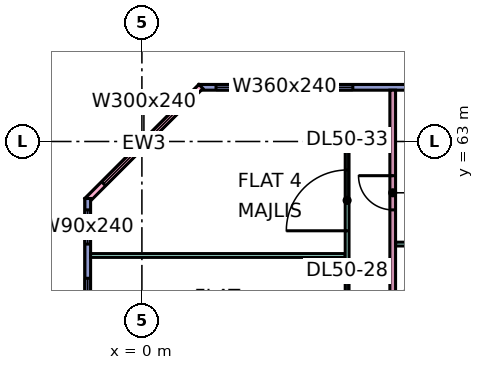
"""IFC4 building model, lengths in metres.
Left out: names, types, materials, properties, quantities, classifications, styles, units other than length and angle.
Written with IfcOpenShell. Run it as: python <this file> out.ifc"""

import sys

from ifc_helpers import new_model, si_unit, direction, frame, frame_2d, origin, place, context, subcontext, project, spatial, rectangle, extrude, element, fill, save


model = new_model("IFC4")
c1 = context("Model", 3, precision=1e-05, world=origin(), true_north=direction((0.0, 1.0)))
c2 = subcontext(c1, "Body", "Model", "MODEL_VIEW")
j1 = project(units=[si_unit("LENGTHUNIT", "METRE"), si_unit("PLANEANGLEUNIT", "RADIAN")], contexts=[c1])
p1 = place(None, origin())
s1 = spatial("IfcSite", under=j1, at=p1, CompositionType="ELEMENT")
p2 = place(p1, origin())
s2 = spatial("IfcBuilding", under=s1, at=p2, CompositionType="ELEMENT")
p3 = place(p2, frame((0.0, 0.0, 215.4)))
s3 = spatial("IfcBuildingStorey", under=s2, at=p3, CompositionType="ELEMENT", Elevation=215.4)
p4 = place(p3, frame((11.925, 64.425, 0.0), z_axis=(0.0, 0.0, 1.0), x_axis=(-1.0, 0.0, 0.0)))
e1 = element("IfcWall", 1, at=p4, inside=s3, PredefinedType="SOLIDWALL", context=c2, shape_type="SweptSolid", body=[
    extrude(rectangle(XDim=10.425, YDim=0.15, at=frame_2d((5.212, 0.0))), origin(), (0.0, 0.0, 1.0), 3.35),
])
p5 = place(p4, frame((6.375, 0.0, 0.45)))
e2 = element("IfcOpeningElement", 2, at=p5, cuts=e1, PredefinedType="OPENING", context=c2, shape_type="SweptSolid", body=[
    extrude(rectangle(XDim=3.6, YDim=2.4, at=frame_2d((1.8, 1.2))), frame((0.0, 0.085, 0.0), z_axis=(0.0, -1.0, 0.0), x_axis=(1.0, 0.0, 0.0)), (0.0, 0.0, 1.0), 0.17),
])
p6 = place(p3, frame((1.553, 64.447, 0.0), z_axis=(0.0, 0.0, 1.0), x_axis=(-0.707106781187, -0.707106781187, 0.0)))
e3 = element("IfcWall", 3, at=p6, inside=s3, PredefinedType="SOLIDWALL", context=c2, shape_type="SweptSolid", body=[
    extrude(rectangle(XDim=4.243, YDim=0.15, at=frame_2d((2.121, 0.0))), origin(), (0.0, 0.0, 1.0), 3.35),
])
p7 = place(p6, frame((0.621, 0.0, 0.45)))
e4 = element("IfcOpeningElement", 4, at=p7, cuts=e3, PredefinedType="OPENING", context=c2, shape_type="SweptSolid", body=[
    extrude(rectangle(XDim=3.0, YDim=2.4, at=frame_2d((1.5, 1.2))), frame((0.0, 0.085, 0.0), z_axis=(0.0, -1.0, 0.0), x_axis=(1.0, 0.0, 0.0)), (0.0, 0.0, 1.0), 0.17),
])
p8 = place(p3, frame((-1.425, 61.5, 0.0), z_axis=(0.0, 0.0, 1.0), x_axis=(0.0, -1.0, 0.0)))
e5 = element("IfcWall", 5, at=p8, inside=s3, PredefinedType="SOLIDWALL", context=c2, shape_type="SweptSolid", body=[
    extrude(rectangle(XDim=13.425, YDim=0.15, at=frame_2d((6.712, 0.0))), origin(), (0.0, 0.0, 1.0), 3.35),
])
p9 = place(p8, frame((0.3, 0.0, 0.45)))
e6 = element("IfcOpeningElement", 6, at=p9, cuts=e5, PredefinedType="OPENING", context=c2, shape_type="SweptSolid", body=[
    extrude(rectangle(XDim=0.9, YDim=2.4, at=frame_2d((0.45, 1.2))), frame((0.0, 0.085, 0.0), z_axis=(0.0, -1.0, 0.0), x_axis=(1.0, 0.0, 0.0)), (0.0, 0.0, 1.0), 0.17),
])
p10 = place(p8, frame((2.1, 0.0, 0.45)))
e7 = element("IfcOpeningElement", 7, at=p10, cuts=e5, PredefinedType="OPENING", context=c2, shape_type="SweptSolid", body=[
    extrude(rectangle(XDim=1.8, YDim=2.4, at=frame_2d((0.9, 1.2))), frame((0.0, 0.085, 0.0), z_axis=(0.0, -1.0, 0.0), x_axis=(1.0, 0.0, 0.0)), (0.0, 0.0, 1.0), 0.17),
])
p11 = place(p8, frame((5.1, 0.0, 0.45)))
e8 = element("IfcOpeningElement", 8, at=p11, cuts=e5, PredefinedType="OPENING", context=c2, shape_type="SweptSolid", body=[
    extrude(rectangle(XDim=1.8, YDim=2.4, at=frame_2d((0.9, 1.2))), frame((0.0, 0.085, 0.0), z_axis=(0.0, -1.0, 0.0), x_axis=(1.0, 0.0, 0.0)), (0.0, 0.0, 1.0), 0.17),
])
p12 = place(p8, frame((8.1, 0.0, 0.45)))
e9 = element("IfcOpeningElement", 9, at=p12, cuts=e5, PredefinedType="OPENING", context=c2, shape_type="SweptSolid", body=[
    extrude(rectangle(XDim=1.8, YDim=2.4, at=frame_2d((0.9, 1.2))), frame((0.0, 0.085, 0.0), z_axis=(0.0, -1.0, 0.0), x_axis=(1.0, 0.0, 0.0)), (0.0, 0.0, 1.0), 0.17),
])
p13 = place(p8, frame((11.062, 0.0, 0.45)))
e10 = element("IfcOpeningElement", 10, at=p13, cuts=e5, PredefinedType="OPENING", context=c2, shape_type="SweptSolid", body=[
    extrude(rectangle(XDim=1.8, YDim=2.4, at=frame_2d((0.9, 1.2))), frame((0.0, 0.085, 0.0), z_axis=(0.0, -1.0, 0.0), x_axis=(1.0, 0.0, 0.0)), (0.0, 0.0, 1.0), 0.17),
])
p14 = place(p3, frame((-1.351, 60.0, 0.0), z_axis=(0.0, 0.0, 1.0), x_axis=(1.0, 0.0, 0.0)))
e11 = element("IfcWall", 11, at=p14, inside=s3, PredefinedType="PARTITIONING", context=c2, shape_type="SweptSolid", body=[
    extrude(rectangle(XDim=6.701, YDim=0.1, at=frame_2d((3.351, 0.0))), origin(), (0.0, 0.0, 1.0), 3.35),
])
p15 = place(p3, frame((5.4, 36.1, 0.0), z_axis=(0.0, 0.0, 1.0), x_axis=(0.0, 1.0, 0.0)))
e12 = element("IfcWall", 12, at=p15, inside=s3, PredefinedType="PARTITIONING", context=c2, shape_type="SweptSolid", body=[
    extrude(rectangle(XDim=26.95, YDim=0.1, at=frame_2d((13.475, 0.0))), origin(), (0.0, 0.0, 1.0), 3.35),
])
p16 = place(p15, frame((0.95, 0.0, 0.0)))
e13 = element("IfcOpeningElement", 13, at=p16, cuts=e12, PredefinedType="OPENING", context=c2, shape_type="SweptSolid", body=[
    extrude(rectangle(XDim=0.9, YDim=2.1, at=frame_2d((0.45, 1.05))), frame((0.0, 0.06, 0.0), z_axis=(0.0, -1.0, 0.0), x_axis=(1.0, 0.0, 0.0)), (0.0, 0.0, 1.0), 0.12),
])
p17 = place(p15, frame((3.95, 0.0, 0.0)))
e14 = element("IfcOpeningElement", 14, at=p17, cuts=e12, PredefinedType="OPENING", context=c2, shape_type="SweptSolid", body=[
    extrude(rectangle(XDim=0.9, YDim=2.1, at=frame_2d((0.45, 1.05))), frame((0.0, 0.06, 0.0), z_axis=(0.0, -1.0, 0.0), x_axis=(1.0, 0.0, 0.0)), (0.0, 0.0, 1.0), 0.12),
])
p18 = place(p15, frame((15.95, 0.0, 0.0)))
e15 = element("IfcOpeningElement", 15, at=p18, cuts=e12, PredefinedType="OPENING", context=c2, shape_type="SweptSolid", body=[
    extrude(rectangle(XDim=0.9, YDim=2.1, at=frame_2d((0.45, 1.05))), frame((0.0, 0.06, 0.0), z_axis=(0.0, -1.0, 0.0), x_axis=(1.0, 0.0, 0.0)), (0.0, 0.0, 1.0), 0.12),
])
p19 = place(p15, frame((18.95, 0.0, 0.0)))
e16 = element("IfcOpeningElement", 16, at=p19, cuts=e12, PredefinedType="OPENING", context=c2, shape_type="SweptSolid", body=[
    extrude(rectangle(XDim=0.9, YDim=2.1, at=frame_2d((0.45, 1.05))), frame((0.0, 0.06, 0.0), z_axis=(0.0, -1.0, 0.0), x_axis=(1.0, 0.0, 0.0)), (0.0, 0.0, 1.0), 0.12),
])
p20 = place(p15, frame((21.95, 0.0, 0.0)))
e17 = element("IfcOpeningElement", 17, at=p20, cuts=e12, PredefinedType="OPENING", context=c2, shape_type="SweptSolid", body=[
    extrude(rectangle(XDim=0.9, YDim=2.1, at=frame_2d((0.45, 1.05))), frame((0.0, 0.06, 0.0), z_axis=(0.0, -1.0, 0.0), x_axis=(1.0, 0.0, 0.0)), (0.0, 0.0, 1.0), 0.12),
])
p21 = place(p15, frame((9.95, 0.0, 0.0)))
e18 = element("IfcOpeningElement", 18, at=p21, cuts=e12, PredefinedType="OPENING", context=c2, shape_type="SweptSolid", body=[
    extrude(rectangle(XDim=0.9, YDim=2.1, at=frame_2d((0.45, 1.05))), frame((0.0, 0.06, 0.0), z_axis=(0.0, -1.0, 0.0), x_axis=(1.0, 0.0, 0.0)), (0.0, 0.0, 1.0), 0.12),
])
p22 = place(p15, frame((24.55, 0.0, 0.0)))
e19 = element("IfcOpeningElement", 19, at=p22, cuts=e12, PredefinedType="OPENING", context=c2, shape_type="SweptSolid", body=[
    extrude(rectangle(XDim=1.6, YDim=2.1, at=frame_2d((0.8, 1.05))), frame((0.0, 0.06, 0.0), z_axis=(0.0, -1.0, 0.0), x_axis=(1.0, 0.0, 0.0)), (0.0, 0.0, 1.0), 0.12),
])
p23 = place(p3, frame((5.45, 63.0, 0.0), z_axis=(0.0, 0.0, 1.0), x_axis=(1.0, 0.0, 0.0)))
e20 = element("IfcWall", 20, at=p23, inside=s3, PredefinedType="PARTITIONING", context=c2, shape_type="SweptSolid", body=[
    extrude(rectangle(XDim=0.55, YDim=0.1, at=frame_2d((0.275, 0.0))), origin(), (0.0, 0.0, 1.0), 3.35),
])
p24 = place(p3, frame((6.6, 39.525, 0.0), z_axis=(0.0, 0.0, 1.0), x_axis=(0.0, 1.0, 0.0)))
e21 = element("IfcWall", 21, at=p24, inside=s3, PredefinedType="PARTITIONING", context=c2, shape_type="SweptSolid", body=[
    extrude(rectangle(XDim=24.825, YDim=0.15, at=frame_2d((12.413, 0.0))), origin(), (0.0, 0.0, 1.0), 3.35),
])
p25 = place(p24, frame((3.225, 0.0, 0.0)))
e22 = element("IfcOpeningElement", 22, at=p25, cuts=e21, PredefinedType="OPENING", context=c2, shape_type="SweptSolid", body=[
    extrude(rectangle(XDim=0.8, YDim=2.1, at=frame_2d((0.4, 1.05))), frame((0.0, 0.085, 0.0), z_axis=(0.0, -1.0, 0.0), x_axis=(1.0, 0.0, 0.0)), (0.0, 0.0, 1.0), 0.17),
])
p26 = place(p24, frame((13.875, 0.0, 0.0)))
e23 = element("IfcOpeningElement", 23, at=p26, cuts=e21, PredefinedType="OPENING", context=c2, shape_type="SweptSolid", body=[
    extrude(rectangle(XDim=0.9, YDim=2.1, at=frame_2d((0.45, 1.05))), frame((0.0, 0.085, 0.0), z_axis=(0.0, -1.0, 0.0), x_axis=(1.0, 0.0, 0.0)), (0.0, 0.0, 1.0), 0.17),
])
p27 = place(p24, frame((6.225, 0.0, 0.0)))
e24 = element("IfcOpeningElement", 24, at=p27, cuts=e21, PredefinedType="OPENING", context=c2, shape_type="SweptSolid", body=[
    extrude(rectangle(XDim=0.8, YDim=2.1, at=frame_2d((0.4, 1.05))), frame((0.0, 0.085, 0.0), z_axis=(0.0, -1.0, 0.0), x_axis=(1.0, 0.0, 0.0)), (0.0, 0.0, 1.0), 0.17),
])
p28 = place(p24, frame((18.525, 0.0, 0.0)))
e25 = element("IfcOpeningElement", 25, at=p28, cuts=e21, PredefinedType="OPENING", context=c2, shape_type="SweptSolid", body=[
    extrude(rectangle(XDim=0.9, YDim=2.1, at=frame_2d((0.45, 1.05))), frame((0.0, 0.085, 0.0), z_axis=(0.0, -1.0, 0.0), x_axis=(1.0, 0.0, 0.0)), (0.0, 0.0, 1.0), 0.17),
])
p29 = place(p24, frame((21.675, 0.0, 0.0)))
e26 = element("IfcOpeningElement", 26, at=p29, cuts=e21, PredefinedType="OPENING", context=c2, shape_type="SweptSolid", body=[
    extrude(rectangle(XDim=0.9, YDim=2.1, at=frame_2d((0.45, 1.05))), frame((0.0, 0.085, 0.0), z_axis=(0.0, -1.0, 0.0), x_axis=(1.0, 0.0, 0.0)), (0.0, 0.0, 1.0), 0.17),
])
p30 = place(p24, frame((9.375, 0.0, 0.0)))
e27 = element("IfcOpeningElement", 27, at=p30, cuts=e21, PredefinedType="OPENING", context=c2, shape_type="SweptSolid", body=[
    extrude(rectangle(XDim=0.8, YDim=2.1, at=frame_2d((0.4, 1.05))), frame((0.0, 0.085, 0.0), z_axis=(0.0, -1.0, 0.0), x_axis=(1.0, 0.0, 0.0)), (0.0, 0.0, 1.0), 0.17),
])
p31 = place(p3, frame((6.675, 60.3, 0.0), z_axis=(0.0, 0.0, 1.0), x_axis=(1.0, 0.0, 0.0)))
e28 = element("IfcWall", 28, at=p31, inside=s3, PredefinedType="PARTITIONING", context=c2, shape_type="SweptSolid", body=[
    extrude(rectangle(XDim=2.825, YDim=0.1, at=frame_2d((1.413, 0.0))), origin(), (0.0, 0.0, 1.0), 3.35),
])
p32 = place(p5, origin())
e29 = element("IfcWindow", 29, at=p32, inside=s3, PartitioningType="SINGLE_PANEL", PredefinedType="WINDOW", context=c2, shape_type="SweptSolid", body=[
    extrude(rectangle(XDim=3.6, YDim=2.4, at=frame_2d((1.8, 1.2))), frame((0.0, 0.03, 0.0), z_axis=(0.0, -1.0, 0.0), x_axis=(1.0, 0.0, 0.0)), (0.0, 0.0, 1.0), 0.06),
])
fill(e2, e29)
p33 = place(p7, origin())
e30 = element("IfcWindow", 30, at=p33, inside=s3, PartitioningType="SINGLE_PANEL", PredefinedType="WINDOW", context=c2, shape_type="SweptSolid", body=[
    extrude(rectangle(XDim=3.0, YDim=2.4, at=frame_2d((1.5, 1.2))), frame((0.0, 0.03, 0.0), z_axis=(0.0, -1.0, 0.0), x_axis=(1.0, 0.0, 0.0)), (0.0, 0.0, 1.0), 0.06),
])
fill(e4, e30)
p34 = place(p9, origin())
e31 = element("IfcWindow", 31, at=p34, inside=s3, PartitioningType="SINGLE_PANEL", PredefinedType="WINDOW", context=c2, shape_type="SweptSolid", body=[
    extrude(rectangle(XDim=0.9, YDim=2.4, at=frame_2d((0.45, 1.2))), frame((0.0, 0.03, 0.0), z_axis=(0.0, -1.0, 0.0), x_axis=(1.0, 0.0, 0.0)), (0.0, 0.0, 1.0), 0.06),
])
fill(e6, e31)
p35 = place(p10, origin())
e32 = element("IfcWindow", 32, at=p35, inside=s3, PartitioningType="SINGLE_PANEL", PredefinedType="WINDOW", context=c2, shape_type="SweptSolid", body=[
    extrude(rectangle(XDim=1.8, YDim=2.4, at=frame_2d((0.9, 1.2))), frame((0.0, 0.03, 0.0), z_axis=(0.0, -1.0, 0.0), x_axis=(1.0, 0.0, 0.0)), (0.0, 0.0, 1.0), 0.06),
])
fill(e7, e32)
p36 = place(p22, origin())
e33 = element("IfcDoor", 33, at=p36, inside=s3, OperationType="DOUBLE_DOOR_SINGLE_SWING", PredefinedType="DOOR", context=c2, shape_type="SweptSolid", body=[
    extrude(rectangle(XDim=1.6, YDim=2.1, at=frame_2d((0.8, 1.05))), frame((0.0, 0.025, 0.0), z_axis=(0.0, -1.0, 0.0), x_axis=(1.0, 0.0, 0.0)), (0.0, 0.0, 1.0), 0.05),
])
fill(e19, e33)
p37 = place(p29, frame((0.9, 0.0, 0.0), z_axis=(0.0, 0.0, 1.0), x_axis=(-1.0, 0.0, 0.0)))
e34 = element("IfcDoor", 34, at=p37, inside=s3, OperationType="SINGLE_SWING_RIGHT", PredefinedType="DOOR", context=c2, shape_type="SweptSolid", body=[
    extrude(rectangle(XDim=0.9, YDim=2.1, at=frame_2d((0.45, 1.05))), frame((0.0, 0.025, 0.0), z_axis=(0.0, -1.0, 0.0), x_axis=(1.0, 0.0, 0.0)), (0.0, 0.0, 1.0), 0.05),
])
fill(e26, e34)
save(model, sys.argv[1])
